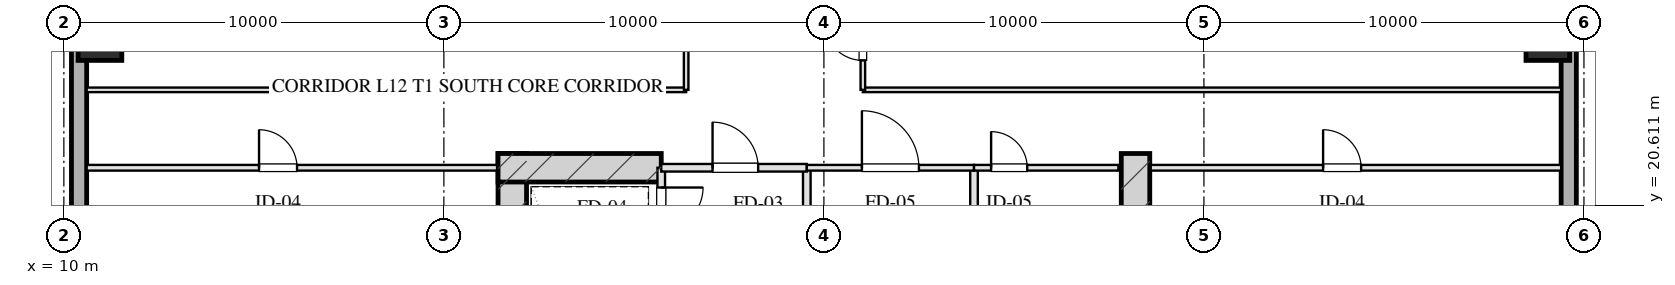
"""IFC4 building model, lengths in metres.
Left out: names, types, materials, properties, quantities, classifications, styles, units other than length and angle.
Written with IfcOpenShell. Run it as: python <this file> out.ifc"""

import sys

from ifc_helpers import new_model, si_unit, direction, frame, frame_2d, origin, origin_2d, place, context, subcontext, project, spatial, rectangle, hollow_rectangle, extrude, element, fill, save


model = new_model("IFC4")
c1 = context("Model", 3, precision=1e-05, world=origin(), true_north=direction((0.0, 1.0)))
c2 = subcontext(c1, "Body", "Model", "MODEL_VIEW")
j1 = project(units=[si_unit("LENGTHUNIT", "METRE"), si_unit("PLANEANGLEUNIT", "RADIAN")], contexts=[c1])
p1 = place(None, origin())
s1 = spatial("IfcSite", under=j1, at=p1, CompositionType="ELEMENT")
p2 = place(p1, origin())
s2 = spatial("IfcBuilding", under=s1, at=p2, CompositionType="ELEMENT")
p3 = place(p2, frame((0.0, 0.0, 54.05)))
s3 = spatial("IfcBuildingStorey", under=s2, at=p3, CompositionType="ELEMENT", Elevation=54.05)
for number, where, z_axis, x_axis in (
    (1, (21.8, 21.975, 0.0), (0.0, 0.0, 1.0), (0.0, -1.0, 0.0)),
    (2, (38.2, 21.975, 0.0), (0.0, 0.0, 1.0), (0.0, -1.0, 0.0)),
):
    element("IfcWall", number, at=place(p3, frame(where, z_axis=z_axis, x_axis=x_axis)), inside=s3, PredefinedType="SHEAR", context=c2, shape_type="SweptSolid", body=[
        extrude(rectangle(XDim=9.63, YDim=0.75, at=frame_2d((4.815, 0.0))), origin(), (0.0, 0.0, 1.0), 3.45),
    ])
p4 = place(p3, frame((21.425, 21.6, 0.0), z_axis=(0.0, 0.0, 1.0), x_axis=(1.0, 0.0, 0.0)))
e3 = element("IfcWall", 3, at=p4, inside=s3, PredefinedType="SHEAR", context=c2, shape_type="SweptSolid", body=[
    extrude(rectangle(XDim=4.295, YDim=0.75, at=frame_2d((2.147, 0.0))), origin(), (0.0, 0.0, 1.0), 3.45),
])
for number, where, z_axis, x_axis in (
    (4, (10.95, 25.0, 0.0), (0.0, 0.0, 1.0), (1.0, 0.0, 0.0)),
    (5, (49.05, 25.0, 0.0), (0.0, 0.0, 1.0), (1.0, 0.0, 0.0)),
):
    element("IfcColumn", number, at=place(p3, frame(where, z_axis=z_axis, x_axis=x_axis)), inside=s3, PredefinedType="COLUMN", context=c2, shape_type="SweptSolid", body=[
        extrude(hollow_rectangle(XDim=1.15, YDim=1.15, WallThickness=0.04, at=origin_2d()), origin(), (0.0, 0.0, 1.0), 3.451),
    ])
p5 = place(p3, frame((10.4, 7.2, 0.0), z_axis=(0.0, 0.0, 1.0), x_axis=(0.0, 1.0, 0.0)))
e6 = element("IfcWall", 6, at=p5, inside=s3, PredefinedType="SOLIDWALL", context=c2, shape_type="SweptSolid", body=[
    extrude(rectangle(XDim=53.6, YDim=0.4, at=frame_2d((26.8, 0.0))), origin(), (0.0, 0.0, 1.0), 2.61),
])
p6 = place(p5, frame((19.15, 0.0, 0.75)))
e7 = element("IfcOpeningElement", 7, at=p6, cuts=e6, PredefinedType="OPENING", context=c2, shape_type="SweptSolid", body=[
    extrude(rectangle(XDim=2.5, YDim=1.46, at=frame_2d((1.25, 0.73))), frame((0.0, 0.21, 0.0), z_axis=(0.0, -1.0, 0.0), x_axis=(1.0, 0.0, 0.0)), (0.0, 0.0, 1.0), 0.42),
])
p7 = place(p5, frame((22.95, 0.0, 0.75)))
e8 = element("IfcOpeningElement", 8, at=p7, cuts=e6, PredefinedType="OPENING", context=c2, shape_type="SweptSolid", body=[
    extrude(rectangle(XDim=2.5, YDim=1.46, at=frame_2d((1.25, 0.73))), frame((0.0, 0.21, 0.0), z_axis=(0.0, -1.0, 0.0), x_axis=(1.0, 0.0, 0.0)), (0.0, 0.0, 1.0), 0.42),
])
p8 = place(p5, frame((31.95, 0.0, 0.75)))
e9 = element("IfcOpeningElement", 9, at=p8, cuts=e6, PredefinedType="OPENING", context=c2, shape_type="SweptSolid", body=[
    extrude(rectangle(XDim=2.5, YDim=1.46, at=frame_2d((1.25, 0.73))), frame((0.0, 0.21, 0.0), z_axis=(0.0, -1.0, 0.0), x_axis=(1.0, 0.0, 0.0)), (0.0, 0.0, 1.0), 0.42),
])
p9 = place(p3, frame((49.6, 60.8, 0.0), z_axis=(0.0, 0.0, 1.0), x_axis=(0.0, -1.0, 0.0)))
e10 = element("IfcWall", 10, at=p9, inside=s3, PredefinedType="SOLIDWALL", context=c2, shape_type="SweptSolid", body=[
    extrude(rectangle(XDim=53.6, YDim=0.4, at=frame_2d((26.8, 0.0))), origin(), (0.0, 0.0, 1.0), 2.61),
])
p10 = place(p3, frame((25.72, 21.6, 0.0), z_axis=(0.0, 0.0, 1.0), x_axis=(0.0, -1.0, 0.0)))
e11 = element("IfcWall", 11, at=p10, inside=s3, PredefinedType="PARTITIONING", context=c2, shape_type="SweptSolid", body=[
    extrude(rectangle(XDim=1.9, YDim=0.2, at=frame_2d((0.95, 0.0))), origin(), (0.0, 0.0, 1.0), 3.175),
])
p11 = place(p10, frame((0.52, 0.0, 0.0)))
e12 = element("IfcOpeningElement", 12, at=p11, cuts=e11, PredefinedType="OPENING", context=c2, shape_type="SweptSolid", body=[
    extrude(rectangle(XDim=1.1, YDim=2.05, at=frame_2d((0.55, 1.025))), frame((0.0, 0.11, 0.0), z_axis=(0.0, -1.0, 0.0), x_axis=(1.0, 0.0, 0.0)), (0.0, 0.0, 1.0), 0.22),
])
p12 = place(p3, frame((29.55, 21.6, 0.0), z_axis=(0.0, 0.0, 1.0), x_axis=(0.0, -1.0, 0.0)))
e13 = element("IfcWall", 13, at=p12, inside=s3, PredefinedType="PARTITIONING", context=c2, shape_type="SweptSolid", body=[
    extrude(rectangle(XDim=8.43, YDim=0.2, at=frame_2d((4.215, 0.0))), origin(), (0.0, 0.0, 1.0), 3.175),
])
p13 = place(p3, frame((25.72, 21.6, 0.0), z_axis=(0.0, 0.0, 1.0), x_axis=(1.0, 0.0, 0.0)))
e14 = element("IfcWall", 14, at=p13, inside=s3, PredefinedType="PARTITIONING", context=c2, shape_type="SweptSolid", body=[
    extrude(rectangle(XDim=3.83, YDim=0.2, at=frame_2d((1.915, 0.0))), origin(), (0.0, 0.0, 1.0), 3.175),
])
p14 = place(p13, frame((1.35, 0.0, 0.0)))
e15 = element("IfcOpeningElement", 15, at=p14, cuts=e14, PredefinedType="OPENING", context=c2, shape_type="SweptSolid", body=[
    extrude(rectangle(XDim=1.2, YDim=2.05, at=frame_2d((0.6, 1.025))), frame((0.0, 0.11, 0.0), z_axis=(0.0, -1.0, 0.0), x_axis=(1.0, 0.0, 0.0)), (0.0, 0.0, 1.0), 0.22),
])
p15 = place(p3, frame((33.95, 21.6, 0.0), z_axis=(0.0, 0.0, 1.0), x_axis=(0.0, -1.0, 0.0)))
e16 = element("IfcWall", 16, at=p15, inside=s3, PredefinedType="PARTITIONING", context=c2, shape_type="SweptSolid", body=[
    extrude(rectangle(XDim=8.43, YDim=0.2, at=frame_2d((4.215, 0.0))), origin(), (0.0, 0.0, 1.0), 3.175),
])
p16 = place(p3, frame((29.55, 21.6, 0.0), z_axis=(0.0, 0.0, 1.0), x_axis=(1.0, 0.0, 0.0)))
e17 = element("IfcWall", 17, at=p16, inside=s3, PredefinedType="PARTITIONING", context=c2, shape_type="SweptSolid", body=[
    extrude(rectangle(XDim=4.4, YDim=0.15, at=frame_2d((2.2, 0.0))), origin(), (0.0, 0.0, 1.0), 3.175),
])
p17 = place(p16, frame((1.45, 0.0, 0.0)))
e18 = element("IfcOpeningElement", 18, at=p17, cuts=e17, PredefinedType="OPENING", context=c2, shape_type="SweptSolid", body=[
    extrude(rectangle(XDim=1.5, YDim=2.05, at=frame_2d((0.75, 1.025))), frame((0.0, 0.085, 0.0), z_axis=(0.0, -1.0, 0.0), x_axis=(1.0, 0.0, 0.0)), (0.0, 0.0, 1.0), 0.17),
])
p18 = place(p3, frame((33.95, 21.6, 0.0), z_axis=(0.0, 0.0, 1.0), x_axis=(1.0, 0.0, 0.0)))
e19 = element("IfcWall", 19, at=p18, inside=s3, PredefinedType="PARTITIONING", context=c2, shape_type="SweptSolid", body=[
    extrude(rectangle(XDim=3.8, YDim=0.15, at=frame_2d((1.9, 0.0))), origin(), (0.0, 0.0, 1.0), 3.175),
])
p19 = place(p18, frame((0.45, 0.0, 0.0)))
e20 = element("IfcOpeningElement", 20, at=p19, cuts=e19, PredefinedType="OPENING", context=c2, shape_type="SweptSolid", body=[
    extrude(rectangle(XDim=0.95, YDim=2.05, at=frame_2d((0.475, 1.025))), frame((0.0, 0.085, 0.0), z_axis=(0.0, -1.0, 0.0), x_axis=(1.0, 0.0, 0.0)), (0.0, 0.0, 1.0), 0.17),
])
p20 = place(p3, frame((10.6, 21.6, 0.0), z_axis=(0.0, 0.0, 1.0), x_axis=(1.0, 0.0, 0.0)))
e21 = element("IfcWall", 21, at=p20, inside=s3, PredefinedType="PARTITIONING", context=c2, shape_type="SweptSolid", body=[
    extrude(rectangle(XDim=10.8, YDim=0.15, at=frame_2d((5.4, 0.0))), origin(), (0.0, 0.0, 1.0), 3.175),
])
p21 = place(p20, frame((4.536, 0.0, 0.0)))
e22 = element("IfcOpeningElement", 22, at=p21, cuts=e21, PredefinedType="OPENING", context=c2, shape_type="SweptSolid", body=[
    extrude(rectangle(XDim=1.0, YDim=2.05, at=frame_2d((0.5, 1.025))), frame((0.0, 0.085, 0.0), z_axis=(0.0, -1.0, 0.0), x_axis=(1.0, 0.0, 0.0)), (0.0, 0.0, 1.0), 0.17),
])
p22 = place(p3, frame((38.6, 21.6, 0.0), z_axis=(0.0, 0.0, 1.0), x_axis=(1.0, 0.0, 0.0)))
e23 = element("IfcWall", 23, at=p22, inside=s3, PredefinedType="PARTITIONING", context=c2, shape_type="SweptSolid", body=[
    extrude(rectangle(XDim=10.8, YDim=0.15, at=frame_2d((5.4, 0.0))), origin(), (0.0, 0.0, 1.0), 3.175),
])
p23 = place(p22, frame((4.536, 0.0, 0.0)))
e24 = element("IfcOpeningElement", 24, at=p23, cuts=e23, PredefinedType="OPENING", context=c2, shape_type="SweptSolid", body=[
    extrude(rectangle(XDim=1.0, YDim=2.05, at=frame_2d((0.5, 1.025))), frame((0.0, 0.085, 0.0), z_axis=(0.0, -1.0, 0.0), x_axis=(1.0, 0.0, 0.0)), (0.0, 0.0, 1.0), 0.17),
])
p24 = place(p3, frame((10.6, 23.65, 0.0), z_axis=(0.0, 0.0, 1.0), x_axis=(1.0, 0.0, 0.0)))
e25 = element("IfcWall", 25, at=p24, inside=s3, PredefinedType="PARTITIONING", context=c2, shape_type="SweptSolid", body=[
    extrude(rectangle(XDim=15.775, YDim=0.12, at=frame_2d((7.887, 0.0))), origin(), (0.0, 0.0, 1.0), 3.175),
])
p25 = place(p3, frame((31.025, 23.65, 0.0), z_axis=(0.0, 0.0, 1.0), x_axis=(1.0, 0.0, 0.0)))
e26 = element("IfcWall", 26, at=p25, inside=s3, PredefinedType="PARTITIONING", context=c2, shape_type="SweptSolid", body=[
    extrude(rectangle(XDim=18.375, YDim=0.12, at=frame_2d((9.188, 0.0))), origin(), (0.0, 0.0, 1.0), 3.175),
])
p26 = place(p3, frame((26.375, 23.65, 0.0), z_axis=(0.0, 0.0, 1.0), x_axis=(0.0, 1.0, 0.0)))
e27 = element("IfcWall", 27, at=p26, inside=s3, PredefinedType="PARTITIONING", context=c2, shape_type="SweptSolid", body=[
    extrude(rectangle(XDim=20.7, YDim=0.12, at=frame_2d((10.35, 0.0))), origin(), (0.0, 0.0, 1.0), 3.175),
])
p27 = place(p26, frame((2.518, 0.0, 0.0)))
e28 = element("IfcOpeningElement", 28, at=p27, cuts=e27, PredefinedType="OPENING", context=c2, shape_type="SweptSolid", body=[
    extrude(rectangle(XDim=0.85, YDim=2.05, at=frame_2d((0.425, 1.025))), frame((0.0, 0.07, 0.0), z_axis=(0.0, -1.0, 0.0), x_axis=(1.0, 0.0, 0.0)), (0.0, 0.0, 1.0), 0.14),
])
p28 = place(p26, frame((9.692, 0.0, 0.0)))
e29 = element("IfcOpeningElement", 29, at=p28, cuts=e27, PredefinedType="OPENING", context=c2, shape_type="SweptSolid", body=[
    extrude(rectangle(XDim=1.0, YDim=2.05, at=frame_2d((0.5, 1.025))), frame((0.0, 0.07, 0.0), z_axis=(0.0, -1.0, 0.0), x_axis=(1.0, 0.0, 0.0)), (0.0, 0.0, 1.0), 0.14),
])
p29 = place(p26, frame((17.025, 0.0, 0.0)))
e30 = element("IfcOpeningElement", 30, at=p29, cuts=e27, PredefinedType="OPENING", context=c2, shape_type="SweptSolid", body=[
    extrude(rectangle(XDim=1.0, YDim=2.05, at=frame_2d((0.5, 1.025))), frame((0.0, 0.07, 0.0), z_axis=(0.0, -1.0, 0.0), x_axis=(1.0, 0.0, 0.0)), (0.0, 0.0, 1.0), 0.14),
])
p30 = place(p3, frame((31.025, 23.65, 0.0), z_axis=(0.0, 0.0, 1.0), x_axis=(0.0, 1.0, 0.0)))
e31 = element("IfcWall", 31, at=p30, inside=s3, PredefinedType="PARTITIONING", context=c2, shape_type="SweptSolid", body=[
    extrude(rectangle(XDim=20.7, YDim=0.12, at=frame_2d((10.35, 0.0))), origin(), (0.0, 0.0, 1.0), 3.175),
])
p31 = place(p30, frame((0.775, 0.0, 0.0)))
e32 = element("IfcOpeningElement", 32, at=p31, cuts=e31, PredefinedType="OPENING", context=c2, shape_type="SweptSolid", body=[
    extrude(rectangle(XDim=1.0, YDim=2.05, at=frame_2d((0.5, 1.025))), frame((0.0, 0.07, 0.0), z_axis=(0.0, -1.0, 0.0), x_axis=(1.0, 0.0, 0.0)), (0.0, 0.0, 1.0), 0.14),
])
p32 = place(p30, frame((3.95, 0.0, 0.0)))
e33 = element("IfcOpeningElement", 33, at=p32, cuts=e31, PredefinedType="OPENING", context=c2, shape_type="SweptSolid", body=[
    extrude(rectangle(XDim=1.0, YDim=2.05, at=frame_2d((0.5, 1.025))), frame((0.0, 0.07, 0.0), z_axis=(0.0, -1.0, 0.0), x_axis=(1.0, 0.0, 0.0)), (0.0, 0.0, 1.0), 0.14),
])
p33 = place(p30, frame((8.455, 0.0, 0.0)))
e34 = element("IfcOpeningElement", 34, at=p33, cuts=e31, PredefinedType="OPENING", context=c2, shape_type="SweptSolid", body=[
    extrude(rectangle(XDim=1.05, YDim=2.05, at=frame_2d((0.525, 1.025))), frame((0.0, 0.07, 0.0), z_axis=(0.0, -1.0, 0.0), x_axis=(1.0, 0.0, 0.0)), (0.0, 0.0, 1.0), 0.14),
])
p34 = place(p30, frame((12.923, 0.0, 0.0)))
e35 = element("IfcOpeningElement", 35, at=p34, cuts=e31, PredefinedType="OPENING", context=c2, shape_type="SweptSolid", body=[
    extrude(rectangle(XDim=1.0, YDim=2.05, at=frame_2d((0.5, 1.025))), frame((0.0, 0.07, 0.0), z_axis=(0.0, -1.0, 0.0), x_axis=(1.0, 0.0, 0.0)), (0.0, 0.0, 1.0), 0.14),
])
p35 = place(p30, frame((16.338, 0.0, 0.0)))
e36 = element("IfcOpeningElement", 36, at=p35, cuts=e31, PredefinedType="OPENING", context=c2, shape_type="SweptSolid", body=[
    extrude(rectangle(XDim=1.0, YDim=2.05, at=frame_2d((0.5, 1.025))), frame((0.0, 0.07, 0.0), z_axis=(0.0, -1.0, 0.0), x_axis=(1.0, 0.0, 0.0)), (0.0, 0.0, 1.0), 0.14),
])
p36 = place(p30, frame((19.045, 0.0, 0.0)))
e37 = element("IfcOpeningElement", 37, at=p36, cuts=e31, PredefinedType="OPENING", context=c2, shape_type="SweptSolid", body=[
    extrude(rectangle(XDim=1.0, YDim=2.05, at=frame_2d((0.5, 1.025))), frame((0.0, 0.07, 0.0), z_axis=(0.0, -1.0, 0.0), x_axis=(1.0, 0.0, 0.0)), (0.0, 0.0, 1.0), 0.14),
])
p37 = place(p11, origin())
e38 = element("IfcDoor", 38, at=p37, inside=s3, OperationType="SINGLE_SWING_LEFT", PredefinedType="DOOR", context=c2, shape_type="SweptSolid", body=[
    extrude(rectangle(XDim=1.1, YDim=2.05, at=frame_2d((0.55, 1.025))), frame((0.0, 0.025, 0.0), z_axis=(0.0, -1.0, 0.0), x_axis=(1.0, 0.0, 0.0)), (0.0, 0.0, 1.0), 0.05),
])
fill(e12, e38)
p38 = place(p14, origin())
e39 = element("IfcDoor", 39, at=p38, inside=s3, OperationType="SINGLE_SWING_LEFT", PredefinedType="DOOR", context=c2, shape_type="SweptSolid", body=[
    extrude(rectangle(XDim=1.2, YDim=2.05, at=frame_2d((0.6, 1.025))), frame((0.0, 0.025, 0.0), z_axis=(0.0, -1.0, 0.0), x_axis=(1.0, 0.0, 0.0)), (0.0, 0.0, 1.0), 0.05),
])
fill(e15, e39)
p39 = place(p17, origin())
e40 = element("IfcDoor", 40, at=p39, inside=s3, OperationType="SINGLE_SWING_LEFT", PredefinedType="DOOR", context=c2, shape_type="SweptSolid", body=[
    extrude(rectangle(XDim=1.5, YDim=2.05, at=frame_2d((0.75, 1.025))), frame((0.0, 0.025, 0.0), z_axis=(0.0, -1.0, 0.0), x_axis=(1.0, 0.0, 0.0)), (0.0, 0.0, 1.0), 0.05),
])
fill(e18, e40)
p40 = place(p19, origin())
e41 = element("IfcDoor", 41, at=p40, inside=s3, OperationType="SINGLE_SWING_LEFT", PredefinedType="DOOR", context=c2, shape_type="SweptSolid", body=[
    extrude(rectangle(XDim=0.95, YDim=2.05, at=frame_2d((0.475, 1.025))), frame((0.0, 0.025, 0.0), z_axis=(0.0, -1.0, 0.0), x_axis=(1.0, 0.0, 0.0)), (0.0, 0.0, 1.0), 0.05),
])
fill(e20, e41)
p41 = place(p21, origin())
e42 = element("IfcDoor", 42, at=p41, inside=s3, OperationType="SINGLE_SWING_LEFT", PredefinedType="DOOR", context=c2, shape_type="SweptSolid", body=[
    extrude(rectangle(XDim=1.0, YDim=2.05, at=frame_2d((0.5, 1.025))), frame((0.0, 0.025, 0.0), z_axis=(0.0, -1.0, 0.0), x_axis=(1.0, 0.0, 0.0)), (0.0, 0.0, 1.0), 0.05),
])
fill(e22, e42)
p42 = place(p23, origin())
e43 = element("IfcDoor", 43, at=p42, inside=s3, OperationType="SINGLE_SWING_LEFT", PredefinedType="DOOR", context=c2, shape_type="SweptSolid", body=[
    extrude(rectangle(XDim=1.0, YDim=2.05, at=frame_2d((0.5, 1.025))), frame((0.0, 0.025, 0.0), z_axis=(0.0, -1.0, 0.0), x_axis=(1.0, 0.0, 0.0)), (0.0, 0.0, 1.0), 0.05),
])
fill(e24, e43)
p43 = place(p31, origin())
e44 = element("IfcDoor", 44, at=p43, inside=s3, OperationType="SINGLE_SWING_RIGHT", PredefinedType="DOOR", context=c2, shape_type="SweptSolid", body=[
    extrude(rectangle(XDim=1.0, YDim=2.05, at=frame_2d((0.5, 1.025))), frame((0.0, 0.025, 0.0), z_axis=(0.0, -1.0, 0.0), x_axis=(1.0, 0.0, 0.0)), (0.0, 0.0, 1.0), 0.05),
])
fill(e32, e44)
save(model, sys.argv[1])
